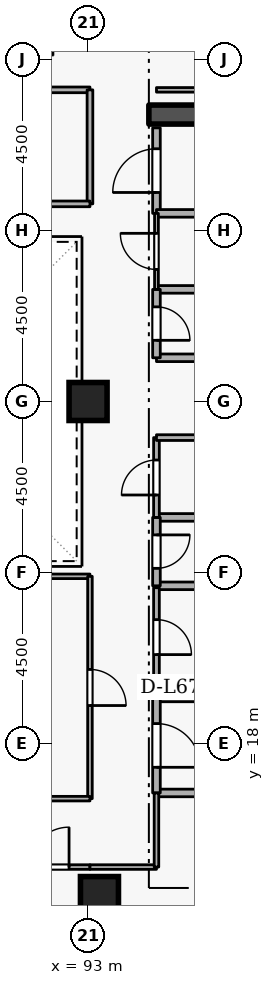
"""IFC4 building model, lengths in metres.
Left out: names, types, materials, properties, quantities, classifications, styles, units other than length and angle.
Written with IfcOpenShell. Run it as: python <this file> out.ifc"""

import sys

from ifc_helpers import new_model, si_unit, direction, frame, frame_2d, origin, origin_2d, place, context, subcontext, project, spatial, rectangle, extrude, element, fill, save


model = new_model("IFC4")
c1 = context("Model", 3, precision=1e-05, world=origin(), true_north=direction((0.0, 1.0)))
c2 = subcontext(c1, "Body", "Model", "MODEL_VIEW")
j1 = project(units=[si_unit("LENGTHUNIT", "METRE"), si_unit("PLANEANGLEUNIT", "RADIAN")], contexts=[c1])
p1 = place(None, origin())
s1 = spatial("IfcSite", under=j1, at=p1, CompositionType="ELEMENT")
p2 = place(p1, origin())
s2 = spatial("IfcBuilding", under=s1, at=p2, CompositionType="ELEMENT")
p3 = place(p2, frame((0.0, 0.0, 251.1)))
s3 = spatial("IfcBuildingStorey", under=s2, at=p3, CompositionType="ELEMENT", Elevation=251.1)
p4 = place(p3, frame((94.6, 34.55, 0.0), z_axis=(0.0, 0.0, 1.0), x_axis=(1.0, 0.0, 0.0)))
e1 = element("IfcWall", 1, at=p4, inside=s3, PredefinedType="SHEAR", context=c2, shape_type="SweptSolid", body=[
    extrude(rectangle(XDim=5.8, YDim=0.5, at=frame_2d((2.9, 0.0))), origin(), (0.0, 0.0, 1.0), 3.6),
])
for number, where, z_axis, x_axis in (
    (2, (93.3, 14.0, 0.0), (0.0, 0.0, 1.0), (1.0, 0.0, 0.0)),
    (3, (93.0, 27.0, 0.0), (0.0, 0.0, 1.0), (1.0, 0.0, 0.0)),
):
    element("IfcColumn", number, at=place(p3, frame(where, z_axis=z_axis, x_axis=x_axis)), inside=s3, PredefinedType="COLUMN", context=c2, shape_type="SweptSolid", body=[
        extrude(rectangle(XDim=1.0, YDim=1.0, at=origin_2d()), origin(), (0.0, 0.0, 1.0), 3.6),
    ])
p5 = place(p3, frame((94.8, 16.7, 0.0), z_axis=(0.0, 0.0, 1.0), x_axis=(1.0, 0.0, 0.0)))
e4 = element("IfcWall", 4, at=p5, inside=s3, PredefinedType="STANDARD", context=c2, shape_type="SweptSolid", body=[
    extrude(rectangle(XDim=5.7, YDim=0.2, at=frame_2d((2.85, 0.0))), origin(), (0.0, 0.0, 1.0), 3.32),
])
p6 = place(p3, frame((97.1, 19.2, 0.0), z_axis=(0.0, 0.0, 1.0), x_axis=(-1.0, 0.0, 0.0)))
e5 = element("IfcWall", 5, at=p6, inside=s3, PredefinedType="STANDARD", context=c2, shape_type="SweptSolid", body=[
    extrude(rectangle(XDim=2.3, YDim=0.2, at=frame_2d((1.15, 0.0))), origin(), (0.0, 0.0, 1.0), 2.525),
])
p7 = place(p3, frame((94.8, 19.2, 0.0), z_axis=(0.0, 0.0, 1.0), x_axis=(0.0, -1.0, 0.0)))
e6 = element("IfcWall", 6, at=p7, inside=s3, PredefinedType="STANDARD", context=c2, shape_type="SweptSolid", body=[
    extrude(rectangle(XDim=2.5, YDim=0.2, at=frame_2d((1.25, 0.0))), origin(), (0.0, 0.0, 1.0), 3.32),
])
p8 = place(p7, frame((0.675, 0.0, 0.0)))
e7 = element("IfcOpeningElement", 7, at=p8, cuts=e6, PredefinedType="OPENING", context=c2, shape_type="SweptSolid", body=[
    extrude(rectangle(XDim=1.15, YDim=2.1, at=frame_2d((0.575, 1.05))), frame((0.0, 0.11, 0.0), z_axis=(0.0, -1.0, 0.0), x_axis=(1.0, 0.0, 0.0)), (0.0, 0.0, 1.0), 0.22),
])
for number, where, z_axis, x_axis in (
    (8, (94.8, 28.15, 0.0), (0.0, 0.0, 1.0), (1.0, 0.0, 0.0)),
    (9, (96.85, 29.95, 0.0), (0.0, 0.0, 1.0), (-1.0, 0.0, 0.0)),
):
    element("IfcWall", number, at=place(p3, frame(where, z_axis=z_axis, x_axis=x_axis)), inside=s3, PredefinedType="STANDARD", context=c2, shape_type="SweptSolid", body=[
        extrude(rectangle(XDim=2.05, YDim=0.2, at=frame_2d((1.025, 0.0))), origin(), (0.0, 0.0, 1.0), 3.32),
    ])
p9 = place(p3, frame((94.8, 29.95, 0.0), z_axis=(0.0, 0.0, 1.0), x_axis=(0.0, -1.0, 0.0)))
e10 = element("IfcWall", 10, at=p9, inside=s3, PredefinedType="STANDARD", context=c2, shape_type="SweptSolid", body=[
    extrude(rectangle(XDim=1.8, YDim=0.2, at=frame_2d((0.9, 0.0))), origin(), (0.0, 0.0, 1.0), 3.32),
])
p10 = place(p9, frame((0.46, 0.0, 0.0)))
e11 = element("IfcOpeningElement", 11, at=p10, cuts=e10, PredefinedType="OPENING", context=c2, shape_type="SweptSolid", body=[
    extrude(rectangle(XDim=0.88, YDim=2.04, at=frame_2d((0.44, 1.02))), frame((0.0, 0.11, 0.0), z_axis=(0.0, -1.0, 0.0), x_axis=(1.0, 0.0, 0.0)), (0.0, 0.0, 1.0), 0.22),
])
for number, where, z_axis, x_axis in (
    (12, (94.8, 22.15, 0.0), (0.0, 0.0, 1.0), (1.0, 0.0, 0.0)),
    (13, (96.85, 23.95, 0.0), (0.0, 0.0, 1.0), (-1.0, 0.0, 0.0)),
):
    element("IfcWall", number, at=place(p3, frame(where, z_axis=z_axis, x_axis=x_axis)), inside=s3, PredefinedType="STANDARD", context=c2, shape_type="SweptSolid", body=[
        extrude(rectangle(XDim=2.05, YDim=0.2, at=frame_2d((1.025, 0.0))), origin(), (0.0, 0.0, 1.0), 3.32),
    ])
p11 = place(p3, frame((94.8, 23.95, 0.0), z_axis=(0.0, 0.0, 1.0), x_axis=(0.0, -1.0, 0.0)))
e14 = element("IfcWall", 14, at=p11, inside=s3, PredefinedType="STANDARD", context=c2, shape_type="SweptSolid", body=[
    extrude(rectangle(XDim=1.8, YDim=0.2, at=frame_2d((0.9, 0.0))), origin(), (0.0, 0.0, 1.0), 3.32),
])
p12 = place(p11, frame((0.46, 0.0, 0.0)))
e15 = element("IfcOpeningElement", 15, at=p12, cuts=e14, PredefinedType="OPENING", context=c2, shape_type="SweptSolid", body=[
    extrude(rectangle(XDim=0.88, YDim=2.04, at=frame_2d((0.44, 1.02))), frame((0.0, 0.11, 0.0), z_axis=(0.0, -1.0, 0.0), x_axis=(1.0, 0.0, 0.0)), (0.0, 0.0, 1.0), 0.22),
])
p13 = place(p3, frame((94.8, 31.95, 0.0), z_axis=(0.0, 0.0, 1.0), x_axis=(0.0, 1.0, 0.0)))
e16 = element("IfcWall", 16, at=p13, inside=s3, PredefinedType="STANDARD", context=c2, shape_type="SweptSolid", body=[
    extrude(rectangle(XDim=2.25, YDim=0.2, at=frame_2d((1.125, 0.0))), origin(), (0.0, 0.0, 1.0), 3.32),
])
p14 = place(p13, frame((0.55, 0.0, 0.0)))
e17 = element("IfcOpeningElement", 17, at=p14, cuts=e16, PredefinedType="OPENING", context=c2, shape_type="SweptSolid", body=[
    extrude(rectangle(XDim=1.15, YDim=2.1, at=frame_2d((0.575, 1.05))), frame((0.0, 0.11, 0.0), z_axis=(0.0, -1.0, 0.0), x_axis=(1.0, 0.0, 0.0)), (0.0, 0.0, 1.0), 0.22),
])
p15 = place(p3, frame((96.85, 31.95, 0.0), z_axis=(0.0, 0.0, 1.0), x_axis=(-1.0, 0.0, 0.0)))
e18 = element("IfcWall", 18, at=p15, inside=s3, PredefinedType="STANDARD", context=c2, shape_type="SweptSolid", body=[
    extrude(rectangle(XDim=2.05, YDim=0.2, at=frame_2d((1.025, 0.0))), origin(), (0.0, 0.0, 1.0), 3.32),
])
p16 = place(p3, frame((94.8, 19.5, 0.0), z_axis=(0.0, 0.0, 1.0), x_axis=(1.0, 0.0, 0.0)))
e19 = element("IfcWall", 19, at=p16, inside=s3, PredefinedType="PARTITIONING", context=c2, shape_type="SweptSolid", body=[
    extrude(rectangle(XDim=2.05, YDim=0.15, at=frame_2d((1.025, 0.0))), origin(), (0.0, 0.0, 1.0), 2.525),
])
p17 = place(p3, frame((94.8, 22.1, 0.0), z_axis=(0.0, 0.0, 1.0), x_axis=(0.0, -1.0, 0.0)))
e20 = element("IfcWall", 20, at=p17, inside=s3, PredefinedType="PARTITIONING", context=c2, shape_type="SweptSolid", body=[
    extrude(rectangle(XDim=2.6, YDim=0.15, at=frame_2d((1.3, 0.0))), origin(), (0.0, 0.0, 1.0), 3.32),
])
p18 = place(p17, frame((0.84, 0.0, 0.0)))
e21 = element("IfcOpeningElement", 21, at=p18, cuts=e20, PredefinedType="OPENING", context=c2, shape_type="SweptSolid", body=[
    extrude(rectangle(XDim=0.92, YDim=2.08, at=frame_2d((0.46, 1.04))), frame((0.0, 0.085, 0.0), z_axis=(0.0, -1.0, 0.0), x_axis=(1.0, 0.0, 0.0)), (0.0, 0.0, 1.0), 0.17),
])
p19 = place(p3, frame((94.8, 23.95, 0.0), z_axis=(0.0, 0.0, 1.0), x_axis=(0.0, 1.0, 0.0)))
e22 = element("IfcWall", 22, at=p19, inside=s3, PredefinedType="PARTITIONING", context=c2, shape_type="SweptSolid", body=[
    extrude(rectangle(XDim=2.1, YDim=0.15, at=frame_2d((1.05, 0.0))), origin(), (0.0, 0.0, 1.0), 3.32),
])
p20 = place(p19, frame((0.59, 0.0, 0.0)))
e23 = element("IfcOpeningElement", 23, at=p20, cuts=e22, PredefinedType="OPENING", context=c2, shape_type="SweptSolid", body=[
    extrude(rectangle(XDim=0.92, YDim=2.08, at=frame_2d((0.46, 1.04))), frame((0.0, 0.085, 0.0), z_axis=(0.0, -1.0, 0.0), x_axis=(1.0, 0.0, 0.0)), (0.0, 0.0, 1.0), 0.17),
])
p21 = place(p3, frame((94.8, 26.05, 0.0), z_axis=(0.0, 0.0, 1.0), x_axis=(1.0, 0.0, 0.0)))
e24 = element("IfcWall", 24, at=p21, inside=s3, PredefinedType="PARTITIONING", context=c2, shape_type="SweptSolid", body=[
    extrude(rectangle(XDim=2.05, YDim=0.15, at=frame_2d((1.025, 0.0))), origin(), (0.0, 0.0, 1.0), 3.32),
])
p22 = place(p3, frame((94.8, 29.95, 0.0), z_axis=(0.0, 0.0, 1.0), x_axis=(0.0, 1.0, 0.0)))
e25 = element("IfcWall", 25, at=p22, inside=s3, PredefinedType="PARTITIONING", context=c2, shape_type="SweptSolid", body=[
    extrude(rectangle(XDim=2.0, YDim=0.1, at=frame_2d((1.0, 0.0))), origin(), (0.0, 0.0, 1.0), 3.32),
])
p23 = place(p22, frame((0.525, 0.0, 0.0)))
e26 = element("IfcOpeningElement", 26, at=p23, cuts=e25, PredefinedType="OPENING", context=c2, shape_type="SweptSolid", body=[
    extrude(rectangle(XDim=0.95, YDim=2.1, at=frame_2d((0.475, 1.05))), frame((0.0, 0.06, 0.0), z_axis=(0.0, -1.0, 0.0), x_axis=(1.0, 0.0, 0.0)), (0.0, 0.0, 1.0), 0.12),
])
p24 = place(p3, frame((94.8, 35.2, 0.0), z_axis=(0.0, 0.0, 1.0), x_axis=(1.0, 0.0, 0.0)))
e27 = element("IfcWall", 27, at=p24, inside=s3, PredefinedType="PARTITIONING", context=c2, shape_type="SweptSolid", body=[
    extrude(rectangle(XDim=5.9, YDim=0.12, at=frame_2d((2.95, 0.0))), origin(), (0.0, 0.0, 1.0), 3.32),
])
p25 = place(p3, frame((90.9, 14.75, 0.0), z_axis=(0.0, 0.0, 1.0), x_axis=(1.0, 0.0, 0.0)))
e28 = element("IfcWall", 28, at=p25, inside=s3, PredefinedType="PARTITIONING", context=c2, shape_type="SweptSolid", body=[
    extrude(rectangle(XDim=2.15, YDim=0.12, at=frame_2d((1.075, 0.0))), origin(), (0.0, 0.0, 1.0), 3.32),
])
p26 = place(p25, frame((0.55, 0.0, 0.0)))
e29 = element("IfcOpeningElement", 29, at=p26, cuts=e28, PredefinedType="OPENING", context=c2, shape_type="SweptSolid", body=[
    extrude(rectangle(XDim=1.05, YDim=2.1, at=frame_2d((0.525, 1.05))), frame((0.0, 0.07, 0.0), z_axis=(0.0, -1.0, 0.0), x_axis=(1.0, 0.0, 0.0)), (0.0, 0.0, 1.0), 0.14),
])
p27 = place(p3, frame((93.05, 14.75, 0.0), z_axis=(0.0, 0.0, 1.0), x_axis=(1.0, 0.0, 0.0)))
e30 = element("IfcWall", 30, at=p27, inside=s3, PredefinedType="PARTITIONING", context=c2, shape_type="SweptSolid", body=[
    extrude(rectangle(XDim=1.75, YDim=0.12, at=frame_2d((0.875, 0.0))), origin(), (0.0, 0.0, 1.0), 3.32),
])
p28 = place(p3, frame((94.8, 14.75, 0.0), z_axis=(0.0, 0.0, 1.0), x_axis=(0.0, 1.0, 0.0)))
e31 = element("IfcWall", 31, at=p28, inside=s3, PredefinedType="PARTITIONING", context=c2, shape_type="SweptSolid", body=[
    extrude(rectangle(XDim=1.95, YDim=0.12, at=frame_2d((0.975, 0.0))), origin(), (0.0, 0.0, 1.0), 3.32),
])
p29 = place(p3, frame((89.3, 22.4, 0.0), z_axis=(0.0, 0.0, 1.0), x_axis=(1.0, 0.0, 0.0)))
e32 = element("IfcWall", 32, at=p29, inside=s3, PredefinedType="PARTITIONING", context=c2, shape_type="SweptSolid", body=[
    extrude(rectangle(XDim=3.75, YDim=0.12, at=frame_2d((1.875, 0.0))), origin(), (0.0, 0.0, 1.0), 3.32),
])
p30 = place(p3, frame((93.05, 22.4, 0.0), z_axis=(0.0, 0.0, 1.0), x_axis=(0.0, -1.0, 0.0)))
e33 = element("IfcWall", 33, at=p30, inside=s3, PredefinedType="PARTITIONING", context=c2, shape_type="SweptSolid", body=[
    extrude(rectangle(XDim=5.85, YDim=0.12, at=frame_2d((2.925, 0.0))), origin(), (0.0, 0.0, 1.0), 3.32),
])
p31 = place(p30, frame((2.45, 0.0, 0.0)))
e34 = element("IfcOpeningElement", 34, at=p31, cuts=e33, PredefinedType="OPENING", context=c2, shape_type="SweptSolid", body=[
    extrude(rectangle(XDim=0.95, YDim=2.1, at=frame_2d((0.475, 1.05))), frame((0.0, 0.07, 0.0), z_axis=(0.0, -1.0, 0.0), x_axis=(1.0, 0.0, 0.0)), (0.0, 0.0, 1.0), 0.14),
])
p32 = place(p3, frame((93.05, 16.55, 0.0), z_axis=(0.0, 0.0, 1.0), x_axis=(-1.0, 0.0, 0.0)))
e35 = element("IfcWall", 35, at=p32, inside=s3, PredefinedType="PARTITIONING", context=c2, shape_type="SweptSolid", body=[
    extrude(rectangle(XDim=3.75, YDim=0.12, at=frame_2d((1.875, 0.0))), origin(), (0.0, 0.0, 1.0), 3.32),
])
p33 = place(p3, frame((89.05, 35.2, 0.0), z_axis=(0.0, 0.0, 1.0), x_axis=(1.0, 0.0, 0.0)))
e36 = element("IfcWall", 36, at=p33, inside=s3, PredefinedType="PARTITIONING", context=c2, shape_type="SweptSolid", body=[
    extrude(rectangle(XDim=4.0, YDim=0.15, at=frame_2d((2.0, 0.0))), origin(), (0.0, 0.0, 1.0), 3.32),
])
p34 = place(p33, frame((1.35, 0.0, 0.0)))
e37 = element("IfcOpeningElement", 37, at=p34, cuts=e36, PredefinedType="OPENING", context=c2, shape_type="SweptSolid", body=[
    extrude(rectangle(XDim=1.3, YDim=2.12, at=frame_2d((0.65, 1.06))), frame((0.0, 0.085, 0.0), z_axis=(0.0, -1.0, 0.0), x_axis=(1.0, 0.0, 0.0)), (0.0, 0.0, 1.0), 0.17),
])
p35 = place(p3, frame((93.05, 35.2, 0.0), z_axis=(0.0, 0.0, 1.0), x_axis=(0.0, -1.0, 0.0)))
e38 = element("IfcWall", 38, at=p35, inside=s3, PredefinedType="PARTITIONING", context=c2, shape_type="SweptSolid", body=[
    extrude(rectangle(XDim=3.0, YDim=0.15, at=frame_2d((1.5, 0.0))), origin(), (0.0, 0.0, 1.0), 3.32),
])
p36 = place(p3, frame((93.05, 32.2, 0.0), z_axis=(0.0, 0.0, 1.0), x_axis=(-1.0, 0.0, 0.0)))
e39 = element("IfcWall", 39, at=p36, inside=s3, PredefinedType="PARTITIONING", context=c2, shape_type="SweptSolid", body=[
    extrude(rectangle(XDim=4.0, YDim=0.15, at=frame_2d((2.0, 0.0))), origin(), (0.0, 0.0, 1.0), 3.32),
])
p37 = place(p8, origin())
e40 = element("IfcDoor", 40, at=p37, inside=s3, OperationType="SINGLE_SWING_RIGHT", PredefinedType="DOOR", context=c2, shape_type="SweptSolid", body=[
    extrude(rectangle(XDim=1.15, YDim=2.1, at=frame_2d((0.575, 1.05))), frame((0.0, 0.025, 0.0), z_axis=(0.0, -1.0, 0.0), x_axis=(1.0, 0.0, 0.0)), (0.0, 0.0, 1.0), 0.05),
])
fill(e7, e40)
p38 = place(p10, origin())
e41 = element("IfcDoor", 41, at=p38, inside=s3, OperationType="SINGLE_SWING_RIGHT", PredefinedType="DOOR", context=c2, shape_type="SweptSolid", body=[
    extrude(rectangle(XDim=0.88, YDim=2.04, at=frame_2d((0.44, 1.02))), frame((0.0, 0.025, 0.0), z_axis=(0.0, -1.0, 0.0), x_axis=(1.0, 0.0, 0.0)), (0.0, 0.0, 1.0), 0.05),
])
fill(e11, e41)
p39 = place(p12, origin())
e42 = element("IfcDoor", 42, at=p39, inside=s3, OperationType="SINGLE_SWING_LEFT", PredefinedType="DOOR", context=c2, shape_type="SweptSolid", body=[
    extrude(rectangle(XDim=0.88, YDim=2.04, at=frame_2d((0.44, 1.02))), frame((0.0, 0.025, 0.0), z_axis=(0.0, -1.0, 0.0), x_axis=(1.0, 0.0, 0.0)), (0.0, 0.0, 1.0), 0.05),
])
fill(e15, e42)
p40 = place(p18, origin())
e43 = element("IfcDoor", 43, at=p40, inside=s3, OperationType="SINGLE_SWING_RIGHT", PredefinedType="DOOR", context=c2, shape_type="SweptSolid", body=[
    extrude(rectangle(XDim=0.92, YDim=2.08, at=frame_2d((0.46, 1.04))), frame((0.0, 0.025, 0.0), z_axis=(0.0, -1.0, 0.0), x_axis=(1.0, 0.0, 0.0)), (0.0, 0.0, 1.0), 0.05),
])
fill(e21, e43)
p41 = place(p20, origin())
e44 = element("IfcDoor", 44, at=p41, inside=s3, OperationType="SINGLE_SWING_LEFT", PredefinedType="DOOR", context=c2, shape_type="SweptSolid", body=[
    extrude(rectangle(XDim=0.92, YDim=2.08, at=frame_2d((0.46, 1.04))), frame((0.0, 0.025, 0.0), z_axis=(0.0, -1.0, 0.0), x_axis=(1.0, 0.0, 0.0)), (0.0, 0.0, 1.0), 0.05),
])
fill(e23, e44)
p42 = place(p23, origin())
e45 = element("IfcDoor", 45, at=p42, inside=s3, OperationType="SINGLE_SWING_RIGHT", PredefinedType="DOOR", context=c2, shape_type="SweptSolid", body=[
    extrude(rectangle(XDim=0.95, YDim=2.1, at=frame_2d((0.475, 1.05))), frame((0.0, 0.025, 0.0), z_axis=(0.0, -1.0, 0.0), x_axis=(1.0, 0.0, 0.0)), (0.0, 0.0, 1.0), 0.05),
])
fill(e26, e45)
p43 = place(p14, origin())
e46 = element("IfcDoor", 46, at=p43, inside=s3, OperationType="SINGLE_SWING_LEFT", PredefinedType="DOOR", context=c2, shape_type="SweptSolid", body=[
    extrude(rectangle(XDim=1.15, YDim=2.1, at=frame_2d((0.575, 1.05))), frame((0.0, 0.025, 0.0), z_axis=(0.0, -1.0, 0.0), x_axis=(1.0, 0.0, 0.0)), (0.0, 0.0, 1.0), 0.05),
])
fill(e17, e46)
p44 = place(p26, origin())
e47 = element("IfcDoor", 47, at=p44, inside=s3, OperationType="SINGLE_SWING_RIGHT", PredefinedType="DOOR", context=c2, shape_type="SweptSolid", body=[
    extrude(rectangle(XDim=1.05, YDim=2.1, at=frame_2d((0.525, 1.05))), frame((0.0, 0.025, 0.0), z_axis=(0.0, -1.0, 0.0), x_axis=(1.0, 0.0, 0.0)), (0.0, 0.0, 1.0), 0.05),
])
fill(e29, e47)
p45 = place(p31, origin())
e48 = element("IfcDoor", 48, at=p45, inside=s3, OperationType="SINGLE_SWING_RIGHT", PredefinedType="DOOR", context=c2, shape_type="SweptSolid", body=[
    extrude(rectangle(XDim=0.95, YDim=2.1, at=frame_2d((0.475, 1.05))), frame((0.0, 0.025, 0.0), z_axis=(0.0, -1.0, 0.0), x_axis=(1.0, 0.0, 0.0)), (0.0, 0.0, 1.0), 0.05),
])
fill(e34, e48)
save(model, sys.argv[1])
